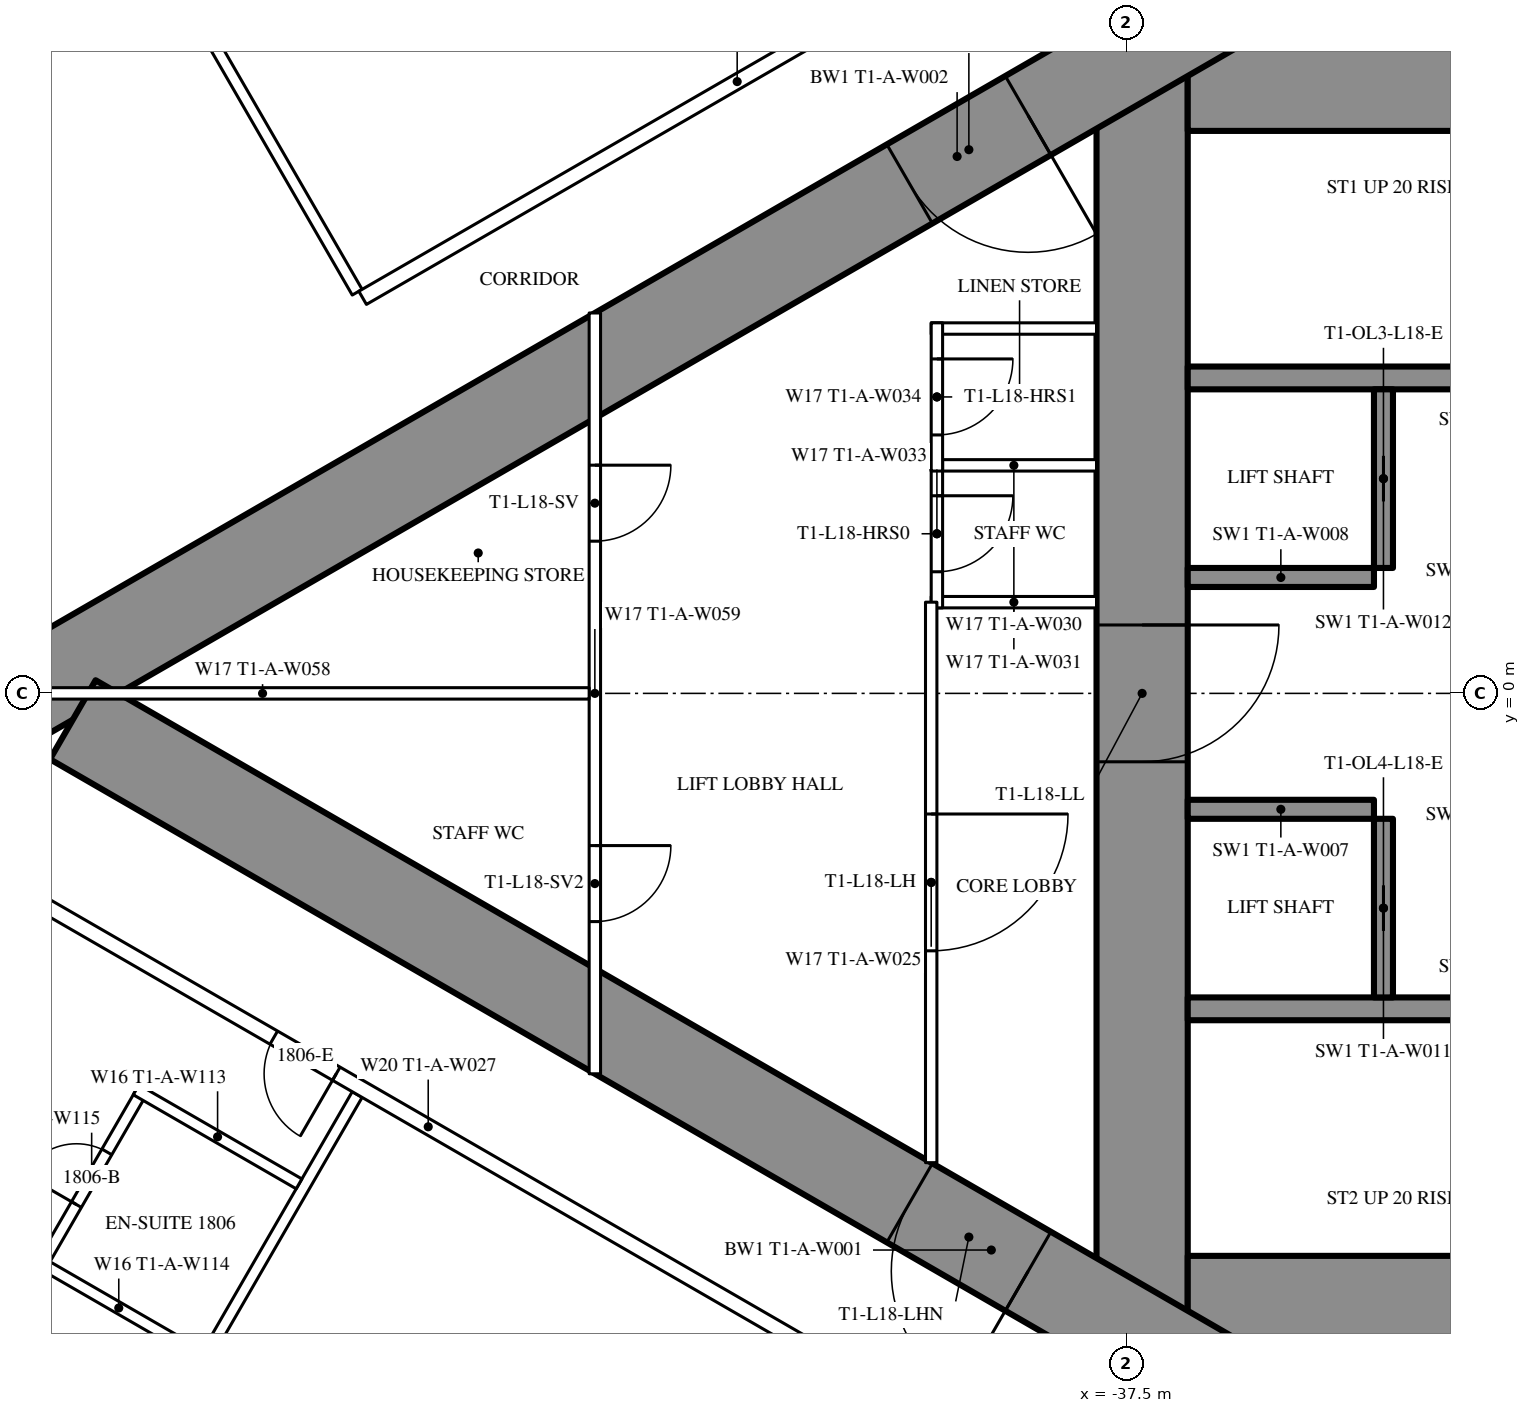
"""IFC4 building model, lengths in metres.
Left out: names, types, materials, properties, quantities, classifications, styles, units other than length and angle.
Written with IfcOpenShell. Run it as: python <this file> out.ifc"""

import sys

from ifc_helpers import new_model, si_unit, direction, frame, frame_2d, origin, place, context, subcontext, project, spatial, rectangle, extrude, element, fill, save


model = new_model("IFC4")
c1 = context("Model", 3, precision=1e-05, world=origin(), true_north=direction((0.0, 1.0)))
c2 = subcontext(c1, "Body", "Model", "MODEL_VIEW")
j1 = project(units=[si_unit("LENGTHUNIT", "METRE"), si_unit("PLANEANGLEUNIT", "RADIAN")], contexts=[c1])
p1 = place(None, origin())
s1 = spatial("IfcSite", under=j1, at=p1, CompositionType="ELEMENT")
p2 = place(p1, origin())
s2 = spatial("IfcBuilding", under=s1, at=p2, CompositionType="ELEMENT")
p3 = place(p2, frame((0.0, 0.0, 70.5)))
s3 = spatial("IfcBuildingStorey", under=s2, at=p3, CompositionType="ELEMENT", Elevation=70.5)
p4 = place(p3, frame((-37.3, 8.6, 0.0), z_axis=(0.0, 0.0, 1.0), x_axis=(0.0, -1.0, 0.0)))
e1 = element("IfcWall", 1, at=p4, inside=s3, PredefinedType="SHEAR", context=c2, shape_type="SweptSolid", body=[
    extrude(rectangle(XDim=17.2, YDim=1.2, at=frame_2d((8.6, 0.0))), origin(), (0.0, 0.0, 1.0), 3.5),
])
p5 = place(p4, frame((7.7, 0.0, 0.0)))
e2 = element("IfcOpeningElement", 2, at=p5, cuts=e1, PredefinedType="OPENING", context=c2, shape_type="SweptSolid", body=[
    extrude(rectangle(XDim=1.8, YDim=2.2, at=frame_2d((0.9, 1.1))), frame((0.0, 0.61, 0.0), z_axis=(0.0, -1.0, 0.0), x_axis=(1.0, 0.0, 0.0)), (0.0, 0.0, 1.0), 1.22),
])
p6 = place(p3, frame((-28.3, 8.0, 0.0), z_axis=(0.0, 0.0, 1.0), x_axis=(-1.0, 0.0, 0.0)))
e3 = element("IfcWall", 3, at=p6, inside=s3, PredefinedType="SHEAR", context=c2, shape_type="SweptSolid", body=[
    extrude(rectangle(XDim=8.4, YDim=1.2, at=frame_2d((4.2, 0.0))), origin(), (0.0, 0.0, 1.0), 3.5),
])
p7 = place(p6, frame((0.25, 0.0, 0.0)))
e4 = element("IfcOpeningElement", 4, at=p7, cuts=e3, PredefinedType="OPENING", context=c2, shape_type="SweptSolid", body=[
    extrude(rectangle(XDim=1.0, YDim=2.2, at=frame_2d((0.5, 1.1))), frame((0.0, 0.61, 0.0), z_axis=(0.0, -1.0, 0.0), x_axis=(1.0, 0.0, 0.0)), (0.0, 0.0, 1.0), 1.22),
])
p8 = place(p3, frame((-28.3, -8.0, 0.0), z_axis=(0.0, 0.0, 1.0), x_axis=(-1.0, 0.0, 0.0)))
e5 = element("IfcWall", 5, at=p8, inside=s3, PredefinedType="SHEAR", context=c2, shape_type="SweptSolid", body=[
    extrude(rectangle(XDim=8.4, YDim=1.2, at=frame_2d((4.2, 0.0))), origin(), (0.0, 0.0, 1.0), 3.5),
])
p9 = place(p8, frame((0.25, 0.0, 0.0)))
e6 = element("IfcOpeningElement", 6, at=p9, cuts=e5, PredefinedType="OPENING", context=c2, shape_type="SweptSolid", body=[
    extrude(rectangle(XDim=1.0, YDim=2.2, at=frame_2d((0.5, 1.1))), frame((0.0, 0.61, 0.0), z_axis=(0.0, -1.0, 0.0), x_axis=(1.0, 0.0, 0.0)), (0.0, 0.0, 1.0), 1.22),
])
for number, where, z_axis, x_axis in (
    (7, (-28.3, 4.15, 0.0), (0.0, 0.0, 1.0), (-1.0, 0.0, 0.0)),
    (8, (-28.3, -4.15, 0.0), (0.0, 0.0, 1.0), (-1.0, 0.0, 0.0)),
):
    element("IfcWall", number, at=place(p3, frame(where, z_axis=z_axis, x_axis=x_axis)), inside=s3, PredefinedType="SHEAR", context=c2, shape_type="SweptSolid", body=[
        extrude(rectangle(XDim=8.4, YDim=0.3, at=frame_2d((4.2, 0.0))), origin(), (0.0, 0.0, 1.0), 3.5),
    ])
p10 = place(p3, frame((-34.125, 4.0, 0.0), z_axis=(0.0, 0.0, 1.0), x_axis=(0.0, -1.0, 0.0)))
e9 = element("IfcWall", 9, at=p10, inside=s3, PredefinedType="SHEAR", context=c2, shape_type="SweptSolid", body=[
    extrude(rectangle(XDim=2.35, YDim=0.25, at=frame_2d((1.175, 0.0))), origin(), (0.0, 0.0, 1.0), 3.5),
])
p11 = place(p10, frame((0.875, 0.0, 0.0)))
e10 = element("IfcOpeningElement", 10, at=p11, cuts=e9, PredefinedType="OPENING", context=c2, shape_type="SweptSolid", body=[
    extrude(rectangle(XDim=0.6, YDim=2.0, at=frame_2d((0.3, 1.0))), frame((0.0, 0.135, 0.0), z_axis=(0.0, -1.0, 0.0), x_axis=(1.0, 0.0, 0.0)), (0.0, 0.0, 1.0), 0.27),
])
p12 = place(p3, frame((-34.25, 1.525, 0.0), z_axis=(0.0, 0.0, 1.0), x_axis=(-1.0, 0.0, 0.0)))
e11 = element("IfcWall", 11, at=p12, inside=s3, PredefinedType="SHEAR", context=c2, shape_type="SweptSolid", body=[
    extrude(rectangle(XDim=2.45, YDim=0.25, at=frame_2d((1.225, 0.0))), origin(), (0.0, 0.0, 1.0), 3.5),
])
p13 = place(p3, frame((-34.125, -1.65, 0.0), z_axis=(0.0, 0.0, 1.0), x_axis=(0.0, -1.0, 0.0)))
e12 = element("IfcWall", 12, at=p13, inside=s3, PredefinedType="SHEAR", context=c2, shape_type="SweptSolid", body=[
    extrude(rectangle(XDim=2.35, YDim=0.25, at=frame_2d((1.175, 0.0))), origin(), (0.0, 0.0, 1.0), 3.5),
])
p14 = place(p13, frame((0.875, 0.0, 0.0)))
e13 = element("IfcOpeningElement", 13, at=p14, cuts=e12, PredefinedType="OPENING", context=c2, shape_type="SweptSolid", body=[
    extrude(rectangle(XDim=0.6, YDim=2.0, at=frame_2d((0.3, 1.0))), frame((0.0, 0.135, 0.0), z_axis=(0.0, -1.0, 0.0), x_axis=(1.0, 0.0, 0.0)), (0.0, 0.0, 1.0), 0.27),
])
p15 = place(p3, frame((-34.25, -1.525, 0.0), z_axis=(0.0, 0.0, 1.0), x_axis=(-1.0, 0.0, 0.0)))
e14 = element("IfcWall", 14, at=p15, inside=s3, PredefinedType="SHEAR", context=c2, shape_type="SweptSolid", body=[
    extrude(rectangle(XDim=2.45, YDim=0.25, at=frame_2d((1.225, 0.0))), origin(), (0.0, 0.0, 1.0), 3.5),
])
p16 = place(p3, frame((-27.2, 14.3, 0.0), z_axis=(0.0, 0.0, 1.0), x_axis=(-0.866026593062, -0.499997940104, 0.0)))
e15 = element("IfcWall", 15, at=p16, inside=s3, PredefinedType="SHEAR", context=c2, shape_type="SweptSolid", body=[
    extrude(rectangle(XDim=28.946, YDim=1.2, at=frame_2d((14.473, 0.0))), origin(), (0.0, 0.0, 1.0), 3.5),
])
p17 = place(p16, frame((4.6, 0.0, 0.0)))
e16 = element("IfcOpeningElement", 16, at=p17, cuts=e15, PredefinedType="OPENING", context=c2, shape_type="SweptSolid", body=[
    extrude(rectangle(XDim=1.0, YDim=2.2, at=frame_2d((0.5, 1.1))), frame((0.0, 0.61, 0.0), z_axis=(0.0, -1.0, 0.0), x_axis=(1.0, 0.0, 0.0)), (0.0, 0.0, 1.0), 1.22),
])
p18 = place(p16, frame((13.395, 0.0, 0.0)))
e17 = element("IfcOpeningElement", 17, at=p18, cuts=e15, PredefinedType="OPENING", context=c2, shape_type="SweptSolid", body=[
    extrude(rectangle(XDim=1.8, YDim=2.2, at=frame_2d((0.9, 1.1))), frame((0.0, 0.61, 0.0), z_axis=(0.0, -1.0, 0.0), x_axis=(1.0, 0.0, 0.0)), (0.0, 0.0, 1.0), 1.22),
])
p19 = place(p3, frame((-27.2, -14.3, 0.0), z_axis=(0.0, 0.0, 1.0), x_axis=(-0.866024021859, 0.500002393557, 0.0)))
e18 = element("IfcWall", 18, at=p19, inside=s3, PredefinedType="SHEAR", context=c2, shape_type="SweptSolid", body=[
    extrude(rectangle(XDim=27.907, YDim=1.2, at=frame_2d((13.954, 0.0))), origin(), (0.0, 0.0, 1.0), 3.5),
])
p20 = place(p19, frame((4.6, 0.0, 0.0)))
e19 = element("IfcOpeningElement", 19, at=p20, cuts=e18, PredefinedType="OPENING", context=c2, shape_type="SweptSolid", body=[
    extrude(rectangle(XDim=1.0, YDim=2.2, at=frame_2d((0.5, 1.1))), frame((0.0, 0.61, 0.0), z_axis=(0.0, -1.0, 0.0), x_axis=(1.0, 0.0, 0.0)), (0.0, 0.0, 1.0), 1.22),
])
p21 = place(p19, frame((13.395, 0.0, 0.0)))
e20 = element("IfcOpeningElement", 20, at=p21, cuts=e18, PredefinedType="OPENING", context=c2, shape_type="SweptSolid", body=[
    extrude(rectangle(XDim=1.8, YDim=2.2, at=frame_2d((0.9, 1.1))), frame((0.0, 0.61, 0.0), z_axis=(0.0, -1.0, 0.0), x_axis=(1.0, 0.0, 0.0)), (0.0, 0.0, 1.0), 1.22),
])
for number, where, z_axis, x_axis in (
    (21, (-47.627, 5.278, 0.0), (0.0, 0.0, 1.0), (-0.5, 0.866, 0.0)),
    (22, (-47.627, -5.278, 0.0), (0.0, 0.0, 1.0), (-0.5, -0.866, 0.0)),
):
    element("IfcWall", number, at=place(p3, frame(where, z_axis=z_axis, x_axis=x_axis)), inside=s3, PredefinedType="PARTITIONING", context=c2, shape_type="SweptSolid", body=[
        extrude(rectangle(XDim=9.51, YDim=0.15, at=frame_2d((4.755, 0.0))), origin(), (0.0, 0.0, 1.0), 2.25),
    ])
p22 = place(p3, frame((-36.92, -11.344, 0.0), z_axis=(0.0, 0.0, 1.0), x_axis=(-0.866028313256, 0.499994960614, 0.0)))
e23 = element("IfcWall", 23, at=p22, inside=s3, PredefinedType="PARTITIONING", context=c2, shape_type="SweptSolid", body=[
    extrude(rectangle(XDim=22.568, YDim=0.2, at=frame_2d((11.284, 0.0))), origin(), (0.0, 0.0, 1.0), 3.25),
])
p23 = place(p22, frame((20.958, 0.0, 0.0)))
e24 = element("IfcOpeningElement", 24, at=p23, cuts=e23, PredefinedType="OPENING", context=c2, shape_type="SweptSolid", body=[
    extrude(rectangle(XDim=0.95, YDim=2.2, at=frame_2d((0.475, 1.1))), frame((0.0, 0.11, 0.0), z_axis=(0.0, -1.0, 0.0), x_axis=(1.0, 0.0, 0.0)), (0.0, 0.0, 1.0), 0.22),
])
p24 = place(p22, frame((12.68, 0.0, 0.0)))
e25 = element("IfcOpeningElement", 25, at=p24, cuts=e23, PredefinedType="OPENING", context=c2, shape_type="SweptSolid", body=[
    extrude(rectangle(XDim=0.95, YDim=2.2, at=frame_2d((0.475, 1.1))), frame((0.0, 0.11, 0.0), z_axis=(0.0, -1.0, 0.0), x_axis=(1.0, 0.0, 0.0)), (0.0, 0.0, 1.0), 0.22),
])
p25 = place(p22, frame((3.35, 0.0, 0.0)))
e26 = element("IfcOpeningElement", 26, at=p25, cuts=e23, PredefinedType="OPENING", context=c2, shape_type="SweptSolid", body=[
    extrude(rectangle(XDim=1.0, YDim=2.2, at=frame_2d((0.5, 1.1))), frame((0.0, 0.11, 0.0), z_axis=(0.0, -1.0, 0.0), x_axis=(1.0, 0.0, 0.0)), (0.0, 0.0, 1.0), 0.22),
])
p26 = place(p3, frame((-37.7, 10.894, 0.0), z_axis=(0.0, 0.0, 1.0), x_axis=(-0.866024459167, -0.500001636122, 0.0)))
e27 = element("IfcWall", 27, at=p26, inside=s3, PredefinedType="PARTITIONING", context=c2, shape_type="SweptSolid", body=[
    extrude(rectangle(XDim=11.38, YDim=0.2, at=frame_2d((5.69, 0.0))), origin(), (0.0, 0.0, 1.0), 3.25),
])
p27 = place(p26, frame((0.6, 0.0, 0.0)))
e28 = element("IfcOpeningElement", 28, at=p27, cuts=e27, PredefinedType="OPENING", context=c2, shape_type="SweptSolid", body=[
    extrude(rectangle(XDim=0.95, YDim=2.2, at=frame_2d((0.475, 1.1))), frame((0.0, 0.11, 0.0), z_axis=(0.0, -1.0, 0.0), x_axis=(1.0, 0.0, 0.0)), (0.0, 0.0, 1.0), 0.22),
])
p28 = place(p3, frame((-49.692, -8.704, 0.0), z_axis=(0.0, 0.0, 1.0), x_axis=(-0.866073894602, 0.499916002032, 0.0)))
e29 = element("IfcWall", 29, at=p28, inside=s3, PredefinedType="PARTITIONING", context=c2, shape_type="SweptSolid", body=[
    extrude(rectangle(XDim=2.475, YDim=0.15, at=frame_2d((1.238, 0.0))), origin(), (0.0, 0.0, 1.0), 3.25),
])
p29 = place(p3, frame((-50.47, -5.253, 0.0), z_axis=(0.0, 0.0, 1.0), x_axis=(-0.500006934395, -0.866021400173, 0.0)))
e30 = element("IfcWall", 30, at=p29, inside=s3, PredefinedType="PARTITIONING", context=c2, shape_type="SweptSolid", body=[
    extrude(rectangle(XDim=2.6, YDim=0.15, at=frame_2d((1.3, 0.0))), origin(), (0.0, 0.0, 1.0), 3.25),
])
p30 = place(p29, frame((0.9, 0.0, 0.0)))
e31 = element("IfcOpeningElement", 31, at=p30, cuts=e30, PredefinedType="OPENING", context=c2, shape_type="SweptSolid", body=[
    extrude(rectangle(XDim=0.8, YDim=2.2, at=frame_2d((0.4, 1.1))), frame((0.0, 0.085, 0.0), z_axis=(0.0, -1.0, 0.0), x_axis=(1.0, 0.0, 0.0)), (0.0, 0.0, 1.0), 0.17),
])
p31 = place(p3, frame((-48.392, -6.453, 0.0), z_axis=(0.0, 0.0, 1.0), x_axis=(-0.86604923931, 0.499958713387, 0.0)))
e32 = element("IfcWall", 32, at=p31, inside=s3, PredefinedType="PARTITIONING", context=c2, shape_type="SweptSolid", body=[
    extrude(rectangle(XDim=2.475, YDim=0.15, at=frame_2d((1.237, 0.0))), origin(), (0.0, 0.0, 1.0), 3.25),
])
for number, where, z_axis, x_axis in (
    (33, (-37.9, 1.2, 0.0), (0.0, 0.0, 1.0), (-1.0, 0.0, 0.0)),
    (34, (-37.9, 3.0, 0.0), (0.0, 0.0, 1.0), (-1.0, 0.0, 0.0)),
    (35, (-37.9, 4.8, 0.0), (0.0, 0.0, 1.0), (-1.0, 0.0, 0.0)),
):
    element("IfcWall", number, at=place(p3, frame(where, z_axis=z_axis, x_axis=x_axis)), inside=s3, PredefinedType="PARTITIONING", context=c2, shape_type="SweptSolid", body=[
        extrude(rectangle(XDim=2.175, YDim=0.15, at=frame_2d((1.087, 0.0))), origin(), (0.0, 0.0, 1.0), 3.25),
    ])
p32 = place(p3, frame((-40.0, 3.075, 0.0), z_axis=(0.0, 0.0, 1.0), x_axis=(0.0, -1.0, 0.0)))
e36 = element("IfcWall", 36, at=p32, inside=s3, PredefinedType="PARTITIONING", context=c2, shape_type="SweptSolid", body=[
    extrude(rectangle(XDim=1.95, YDim=0.15, at=frame_2d((0.975, 0.0))), origin(), (0.0, 0.0, 1.0), 3.25),
])
p33 = place(p32, frame((0.475, 0.0, 0.0)))
e37 = element("IfcOpeningElement", 37, at=p33, cuts=e36, PredefinedType="OPENING", context=c2, shape_type="SweptSolid", body=[
    extrude(rectangle(XDim=1.0, YDim=2.2, at=frame_2d((0.5, 1.1))), frame((0.0, 0.085, 0.0), z_axis=(0.0, -1.0, 0.0), x_axis=(1.0, 0.0, 0.0)), (0.0, 0.0, 1.0), 0.17),
])
p34 = place(p3, frame((-40.0, 4.875, 0.0), z_axis=(0.0, 0.0, 1.0), x_axis=(0.0, -1.0, 0.0)))
e38 = element("IfcWall", 38, at=p34, inside=s3, PredefinedType="PARTITIONING", context=c2, shape_type="SweptSolid", body=[
    extrude(rectangle(XDim=1.95, YDim=0.15, at=frame_2d((0.975, 0.0))), origin(), (0.0, 0.0, 1.0), 3.25),
])
p35 = place(p34, frame((0.475, 0.0, 0.0)))
e39 = element("IfcOpeningElement", 39, at=p35, cuts=e38, PredefinedType="OPENING", context=c2, shape_type="SweptSolid", body=[
    extrude(rectangle(XDim=1.0, YDim=2.2, at=frame_2d((0.5, 1.1))), frame((0.0, 0.085, 0.0), z_axis=(0.0, -1.0, 0.0), x_axis=(1.0, 0.0, 0.0)), (0.0, 0.0, 1.0), 0.17),
])
p36 = place(p3, frame((-40.075, 1.2, 0.0), z_axis=(0.0, 0.0, 1.0), x_axis=(0.0, -1.0, 0.0)))
e40 = element("IfcWall", 40, at=p36, inside=s3, PredefinedType="PARTITIONING", context=c2, shape_type="SweptSolid", body=[
    extrude(rectangle(XDim=7.374, YDim=0.15, at=frame_2d((3.687, 0.0))), origin(), (0.0, 0.0, 1.0), 3.25),
])
p37 = place(p36, frame((2.787, 0.0, 0.0)))
e41 = element("IfcOpeningElement", 41, at=p37, cuts=e40, PredefinedType="OPENING", context=c2, shape_type="SweptSolid", body=[
    extrude(rectangle(XDim=1.8, YDim=2.2, at=frame_2d((0.9, 1.1))), frame((0.0, 0.085, 0.0), z_axis=(0.0, -1.0, 0.0), x_axis=(1.0, 0.0, 0.0)), (0.0, 0.0, 1.0), 0.17),
])
p38 = place(p3, frame((-44.5, 5.005, 0.0), z_axis=(0.0, 0.0, 1.0), x_axis=(0.0, -1.0, 0.0)))
e42 = element("IfcWall", 42, at=p38, inside=s3, PredefinedType="PARTITIONING", context=c2, shape_type="SweptSolid", body=[
    extrude(rectangle(XDim=10.009, YDim=0.15, at=frame_2d((5.005, 0.0))), origin(), (0.0, 0.0, 1.0), 2.45),
])
p39 = place(p38, frame((2.002, 0.0, 0.0)))
e43 = element("IfcOpeningElement", 43, at=p39, cuts=e42, PredefinedType="OPENING", context=c2, shape_type="SweptSolid", body=[
    extrude(rectangle(XDim=1.0, YDim=2.2, at=frame_2d((0.5, 1.1))), frame((0.0, 0.085, 0.0), z_axis=(0.0, -1.0, 0.0), x_axis=(1.0, 0.0, 0.0)), (0.0, 0.0, 1.0), 0.17),
])
p40 = place(p38, frame((7.007, 0.0, 0.0)))
e44 = element("IfcOpeningElement", 44, at=p40, cuts=e42, PredefinedType="OPENING", context=c2, shape_type="SweptSolid", body=[
    extrude(rectangle(XDim=1.0, YDim=2.2, at=frame_2d((0.5, 1.1))), frame((0.0, 0.085, 0.0), z_axis=(0.0, -1.0, 0.0), x_axis=(1.0, 0.0, 0.0)), (0.0, 0.0, 1.0), 0.17),
])
p41 = place(p3, frame((-44.575, 0.0, 0.0), z_axis=(0.0, 0.0, 1.0), x_axis=(-1.0, 0.0, 0.0)))
e45 = element("IfcWall", 45, at=p41, inside=s3, PredefinedType="PARTITIONING", context=c2, shape_type="SweptSolid", body=[
    extrude(rectangle(XDim=8.593, YDim=0.15, at=frame_2d((4.297, 0.0))), origin(), (0.0, 0.0, 1.0), 2.25),
])
p42 = place(p30, origin())
e46 = element("IfcDoor", 46, at=p42, inside=s3, OperationType="SINGLE_SWING_RIGHT", PredefinedType="DOOR", context=c2, shape_type="SweptSolid", body=[
    extrude(rectangle(XDim=0.8, YDim=2.2, at=frame_2d((0.4, 1.1))), frame((0.0, 0.025, 0.0), z_axis=(0.0, -1.0, 0.0), x_axis=(1.0, 0.0, 0.0)), (0.0, 0.0, 1.0), 0.05),
])
fill(e31, e46)
p43 = place(p24, origin())
e47 = element("IfcDoor", 47, at=p43, inside=s3, OperationType="SINGLE_SWING_LEFT", PredefinedType="DOOR", context=c2, shape_type="SweptSolid", body=[
    extrude(rectangle(XDim=0.95, YDim=2.2, at=frame_2d((0.475, 1.1))), frame((0.0, 0.025, 0.0), z_axis=(0.0, -1.0, 0.0), x_axis=(1.0, 0.0, 0.0)), (0.0, 0.0, 1.0), 0.05),
])
fill(e25, e47)
p44 = place(p33, origin())
e48 = element("IfcDoor", 48, at=p44, inside=s3, OperationType="SINGLE_SWING_LEFT", PredefinedType="DOOR", context=c2, shape_type="SweptSolid", body=[
    extrude(rectangle(XDim=1.0, YDim=2.2, at=frame_2d((0.5, 1.1))), frame((0.0, 0.025, 0.0), z_axis=(0.0, -1.0, 0.0), x_axis=(1.0, 0.0, 0.0)), (0.0, 0.0, 1.0), 0.05),
])
fill(e37, e48)
p45 = place(p35, origin())
e49 = element("IfcDoor", 49, at=p45, inside=s3, OperationType="SINGLE_SWING_LEFT", PredefinedType="DOOR", context=c2, shape_type="SweptSolid", body=[
    extrude(rectangle(XDim=1.0, YDim=2.2, at=frame_2d((0.5, 1.1))), frame((0.0, 0.025, 0.0), z_axis=(0.0, -1.0, 0.0), x_axis=(1.0, 0.0, 0.0)), (0.0, 0.0, 1.0), 0.05),
])
fill(e39, e49)
p46 = place(p37, origin())
e50 = element("IfcDoor", 50, at=p46, inside=s3, OperationType="DOUBLE_DOOR_SINGLE_SWING", PredefinedType="DOOR", context=c2, shape_type="SweptSolid", body=[
    extrude(rectangle(XDim=1.8, YDim=2.2, at=frame_2d((0.9, 1.1))), frame((0.0, 0.025, 0.0), z_axis=(0.0, -1.0, 0.0), x_axis=(1.0, 0.0, 0.0)), (0.0, 0.0, 1.0), 0.05),
])
fill(e41, e50)
p47 = place(p39, origin())
e51 = element("IfcDoor", 51, at=p47, inside=s3, OperationType="SINGLE_SWING_LEFT", PredefinedType="DOOR", context=c2, shape_type="SweptSolid", body=[
    extrude(rectangle(XDim=1.0, YDim=2.2, at=frame_2d((0.5, 1.1))), frame((0.0, 0.025, 0.0), z_axis=(0.0, -1.0, 0.0), x_axis=(1.0, 0.0, 0.0)), (0.0, 0.0, 1.0), 0.05),
])
fill(e43, e51)
p48 = place(p40, origin())
e52 = element("IfcDoor", 52, at=p48, inside=s3, OperationType="SINGLE_SWING_LEFT", PredefinedType="DOOR", context=c2, shape_type="SweptSolid", body=[
    extrude(rectangle(XDim=1.0, YDim=2.2, at=frame_2d((0.5, 1.1))), frame((0.0, 0.025, 0.0), z_axis=(0.0, -1.0, 0.0), x_axis=(1.0, 0.0, 0.0)), (0.0, 0.0, 1.0), 0.05),
])
fill(e44, e52)
p49 = place(p18, origin())
e53 = element("IfcDoor", 53, at=p49, inside=s3, OperationType="DOUBLE_DOOR_SINGLE_SWING", PredefinedType="DOOR", context=c2, shape_type="SweptSolid", body=[
    extrude(rectangle(XDim=1.8, YDim=2.2, at=frame_2d((0.9, 1.1))), frame((0.0, 0.025, 0.0), z_axis=(0.0, -1.0, 0.0), x_axis=(1.0, 0.0, 0.0)), (0.0, 0.0, 1.0), 0.05),
])
fill(e17, e53)
p50 = place(p21, origin())
e54 = element("IfcDoor", 54, at=p50, inside=s3, OperationType="DOUBLE_DOOR_SINGLE_SWING", PredefinedType="DOOR", context=c2, shape_type="SweptSolid", body=[
    extrude(rectangle(XDim=1.8, YDim=2.2, at=frame_2d((0.9, 1.1))), frame((0.0, 0.025, 0.0), z_axis=(0.0, -1.0, 0.0), x_axis=(1.0, 0.0, 0.0)), (0.0, 0.0, 1.0), 0.05),
])
fill(e20, e54)
p51 = place(p5, origin())
e55 = element("IfcDoor", 55, at=p51, inside=s3, OperationType="DOUBLE_DOOR_SINGLE_SWING", PredefinedType="DOOR", context=c2, shape_type="SweptSolid", body=[
    extrude(rectangle(XDim=1.8, YDim=2.2, at=frame_2d((0.9, 1.1))), frame((0.0, 0.025, 0.0), z_axis=(0.0, -1.0, 0.0), x_axis=(1.0, 0.0, 0.0)), (0.0, 0.0, 1.0), 0.05),
])
fill(e2, e55)
p52 = place(p11, origin())
e56 = element("IfcDoor", 56, at=p52, inside=s3, OperationType="SLIDING_TO_LEFT", PredefinedType="DOOR", context=c2, shape_type="SweptSolid", body=[
    extrude(rectangle(XDim=0.6, YDim=2.0, at=frame_2d((0.3, 1.0))), frame((0.0, 0.025, 0.0), z_axis=(0.0, -1.0, 0.0), x_axis=(1.0, 0.0, 0.0)), (0.0, 0.0, 1.0), 0.05),
])
fill(e10, e56)
p53 = place(p14, origin())
e57 = element("IfcDoor", 57, at=p53, inside=s3, OperationType="SLIDING_TO_LEFT", PredefinedType="DOOR", context=c2, shape_type="SweptSolid", body=[
    extrude(rectangle(XDim=0.6, YDim=2.0, at=frame_2d((0.3, 1.0))), frame((0.0, 0.025, 0.0), z_axis=(0.0, -1.0, 0.0), x_axis=(1.0, 0.0, 0.0)), (0.0, 0.0, 1.0), 0.05),
])
fill(e13, e57)
save(model, sys.argv[1])
